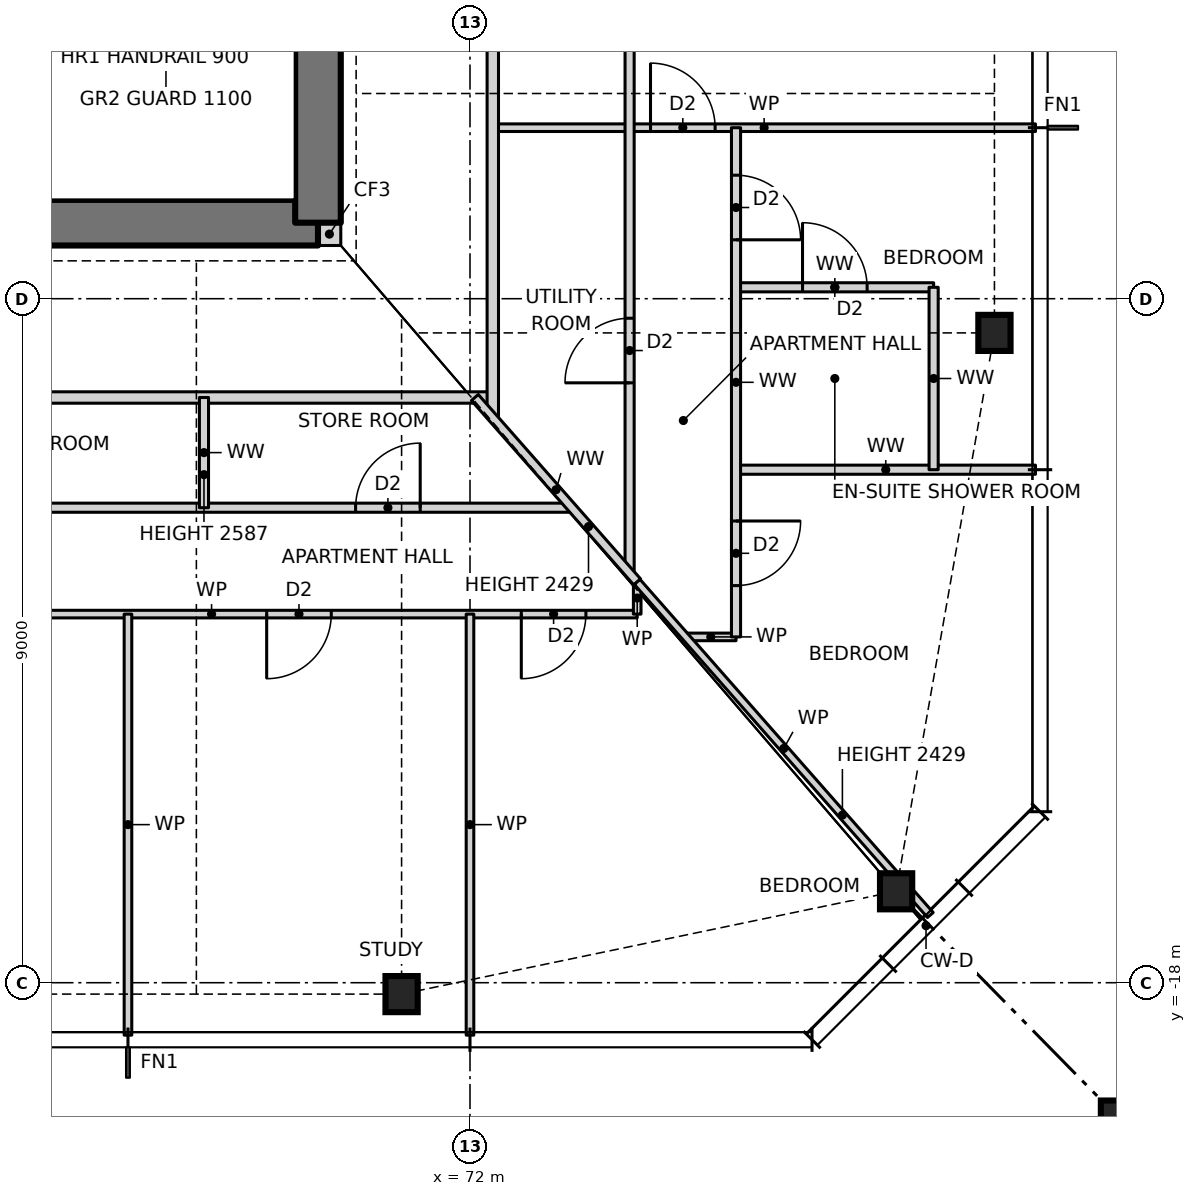
"""IFC4 building model, lengths in metres.
Left out: names, types, materials, properties, quantities, classifications, styles, units other than length and angle.
Written with IfcOpenShell. Run it as: python <this file> out.ifc"""

import sys

from ifc_helpers import new_model, si_unit, direction, frame, frame_2d, origin, origin_2d, place, context, subcontext, project, spatial, rectangle, hollow_rectangle, i_section, extrude, element, fill, save


model = new_model("IFC4")
c1 = context("Model", 3, precision=1e-05, world=origin(), true_north=direction((0.0, 1.0)))
c2 = subcontext(c1, "Body", "Model", "MODEL_VIEW")
j1 = project(units=[si_unit("LENGTHUNIT", "METRE"), si_unit("PLANEANGLEUNIT", "RADIAN")], contexts=[c1])
p1 = place(None, origin())
s1 = spatial("IfcSite", under=j1, at=p1, CompositionType="ELEMENT")
p2 = place(p1, origin())
s2 = spatial("IfcBuilding", under=s1, at=p2, CompositionType="ELEMENT")
p3 = place(p2, frame((0.0, 0.0, 32.5)))
s3 = spatial("IfcBuildingStorey", under=s2, at=p3, CompositionType="ELEMENT", Elevation=32.5)
for number, where, z_axis, x_axis in (
    (1, (71.1, -18.15, 0.0), (0.0, 0.0, 1.0), (1.0, 0.0, 0.0)),
    (2, (77.606, -16.797, 0.0), (0.0, 0.0, 1.0), (1.0, 0.0, 0.0)),
    (3, (78.9, -9.45, 0.0), (0.0, 0.0, 1.0), (1.0, 0.0, 0.0)),
):
    element("IfcColumn", number, at=place(p3, frame(where, z_axis=z_axis, x_axis=x_axis)), inside=s3, PredefinedType="COLUMN", context=c2, shape_type="SweptSolid", body=[
        extrude(i_section(OverallWidth=0.424, OverallDepth=0.475, WebThickness=0.048, FlangeThickness=0.077, at=origin_2d()), origin(), (0.0, 0.0, 1.0), 3.5),
    ])
p4 = place(p3, frame((80.9, -20.15, 0.0), z_axis=(0.0, 0.0, 1.0), x_axis=(1.0, 0.0, 0.0)))
e4 = element("IfcColumn", 4, at=p4, inside=s3, PredefinedType="COLUMN", context=c2, shape_type="SweptSolid", body=[
    extrude(hollow_rectangle(XDim=1.2, YDim=1.2, WallThickness=0.07, at=origin_2d()), origin(), (0.0, 0.0, 1.0), 3.5),
])
p5 = place(p3, frame((70.0, -8.15, 0.0), z_axis=(0.0, 0.0, 1.0), x_axis=(1.0, 0.0, 0.0)))
e5 = element("IfcWall", 5, at=p5, inside=s3, PredefinedType="SOLIDWALL", context=c2, shape_type="SweptSolid", body=[
    extrude(rectangle(XDim=0.3, YDim=0.3, at=frame_2d((0.15, 0.0))), origin(), (0.0, 0.0, 1.0), 3.5),
])
p6 = place(p3, frame((56.0, -8.0, 0.0), z_axis=(0.0, 0.0, 1.0), x_axis=(1.0, 0.0, 0.0)))
e6 = element("IfcWall", 6, at=p6, inside=s3, PredefinedType="SHEAR", context=c2, shape_type="SweptSolid", body=[
    extrude(rectangle(XDim=14.0, YDim=0.6, at=frame_2d((7.0, 0.0))), origin(), (0.0, 0.0, 1.0), 3.5),
])
p7 = place(p6, frame((2.7, 0.0, 0.0)))
e7 = element("IfcOpeningElement", 7, at=p7, cuts=e6, PredefinedType="OPENING", context=c2, shape_type="SweptSolid", body=[
    extrude(rectangle(XDim=0.9, YDim=2.1, at=frame_2d((0.45, 1.05))), frame((0.0, 0.31, 0.0), z_axis=(0.0, -1.0, 0.0), x_axis=(1.0, 0.0, 0.0)), (0.0, 0.0, 1.0), 0.62),
])
p8 = place(p6, frame((7.7, 0.0, 0.0)))
e8 = element("IfcOpeningElement", 8, at=p8, cuts=e6, PredefinedType="OPENING", context=c2, shape_type="SweptSolid", body=[
    extrude(rectangle(XDim=0.9, YDim=2.1, at=frame_2d((0.45, 1.05))), frame((0.0, 0.31, 0.0), z_axis=(0.0, -1.0, 0.0), x_axis=(1.0, 0.0, 0.0)), (0.0, 0.0, 1.0), 0.62),
])
p9 = place(p3, frame((70.0, -8.0, 0.0), z_axis=(0.0, 0.0, 1.0), x_axis=(0.0, 1.0, 0.0)))
e9 = element("IfcWall", 9, at=p9, inside=s3, PredefinedType="SHEAR", context=c2, shape_type="SweptSolid", body=[
    extrude(rectangle(XDim=16.0, YDim=0.6, at=frame_2d((8.0, 0.0))), origin(), (0.0, 0.0, 1.0), 3.5),
])
p10 = place(p9, frame((7.5, 0.0, 0.0)))
e10 = element("IfcOpeningElement", 10, at=p10, cuts=e9, PredefinedType="OPENING", context=c2, shape_type="SweptSolid", body=[
    extrude(rectangle(XDim=1.0, YDim=2.1, at=frame_2d((0.5, 1.05))), frame((0.0, 0.31, 0.0), z_axis=(0.0, -1.0, 0.0), x_axis=(1.0, 0.0, 0.0)), (0.0, 0.0, 1.0), 0.62),
])
p11 = place(p3, frame((74.836, -13.45, 0.0), z_axis=(0.0, 0.0, 1.0), x_axis=(1.0, 0.0, 0.0)))
e11 = element("IfcWall", 11, at=p11, inside=s3, PredefinedType="PARTITIONING", context=c2, shape_type="SweptSolid", body=[
    extrude(rectangle(XDim=0.664, YDim=0.1, at=frame_2d((0.332, 0.0))), origin(), (0.0, 0.0, 1.0), 3.27),
])
p12 = place(p3, frame((63.0, -13.15, 0.0), z_axis=(0.0, 0.0, 1.0), x_axis=(1.0, 0.0, 0.0)))
e12 = element("IfcWall", 12, at=p12, inside=s3, PredefinedType="PARTITIONING", context=c2, shape_type="SweptSolid", body=[
    extrude(rectangle(XDim=11.2, YDim=0.1, at=frame_2d((5.6, 0.0))), origin(), (0.0, 0.0, 1.0), 3.27),
])
p13 = place(p12, frame((1.825, 0.0, 0.0)))
e13 = element("IfcOpeningElement", 13, at=p13, cuts=e12, PredefinedType="OPENING", context=c2, shape_type="SweptSolid", body=[
    extrude(rectangle(XDim=0.85, YDim=2.1, at=frame_2d((0.425, 1.05))), frame((0.0, 0.06, 0.0), z_axis=(0.0, -1.0, 0.0), x_axis=(1.0, 0.0, 0.0)), (0.0, 0.0, 1.0), 0.12),
])
p14 = place(p12, frame((6.325, 0.0, 0.0)))
e14 = element("IfcOpeningElement", 14, at=p14, cuts=e12, PredefinedType="OPENING", context=c2, shape_type="SweptSolid", body=[
    extrude(rectangle(XDim=0.85, YDim=2.1, at=frame_2d((0.425, 1.05))), frame((0.0, 0.06, 0.0), z_axis=(0.0, -1.0, 0.0), x_axis=(1.0, 0.0, 0.0)), (0.0, 0.0, 1.0), 0.12),
])
p15 = place(p12, frame((9.675, 0.0, 0.0)))
e15 = element("IfcOpeningElement", 15, at=p15, cuts=e12, PredefinedType="OPENING", context=c2, shape_type="SweptSolid", body=[
    extrude(rectangle(XDim=0.85, YDim=2.1, at=frame_2d((0.425, 1.05))), frame((0.0, 0.06, 0.0), z_axis=(0.0, -1.0, 0.0), x_axis=(1.0, 0.0, 0.0)), (0.0, 0.0, 1.0), 0.12),
])
p16 = place(p3, frame((54.0, -11.75, 0.0), z_axis=(0.0, 0.0, 1.0), x_axis=(1.0, 0.0, 0.0)))
e16 = element("IfcWall", 16, at=p16, inside=s3, PredefinedType="PARTITIONING", context=c2, shape_type="SweptSolid", body=[
    extrude(rectangle(XDim=19.34, YDim=0.12, at=frame_2d((9.67, 0.0))), origin(), (0.0, 0.0, 1.0), 3.27),
])
p17 = place(p16, frame((1.375, 0.0, 0.0)))
e17 = element("IfcOpeningElement", 17, at=p17, cuts=e16, PredefinedType="OPENING", context=c2, shape_type="SweptSolid", body=[
    extrude(rectangle(XDim=0.85, YDim=2.1, at=frame_2d((0.425, 1.05))), frame((0.0, 0.07, 0.0), z_axis=(0.0, -1.0, 0.0), x_axis=(1.0, 0.0, 0.0)), (0.0, 0.0, 1.0), 0.14),
])
p18 = place(p16, frame((4.575, 0.0, 0.0)))
e18 = element("IfcOpeningElement", 18, at=p18, cuts=e16, PredefinedType="OPENING", context=c2, shape_type="SweptSolid", body=[
    extrude(rectangle(XDim=0.85, YDim=2.1, at=frame_2d((0.425, 1.05))), frame((0.0, 0.07, 0.0), z_axis=(0.0, -1.0, 0.0), x_axis=(1.0, 0.0, 0.0)), (0.0, 0.0, 1.0), 0.14),
])
p19 = place(p16, frame((11.325, 0.0, 0.0)))
e19 = element("IfcOpeningElement", 19, at=p19, cuts=e16, PredefinedType="OPENING", context=c2, shape_type="SweptSolid", body=[
    extrude(rectangle(XDim=0.85, YDim=2.1, at=frame_2d((0.425, 1.05))), frame((0.0, 0.07, 0.0), z_axis=(0.0, -1.0, 0.0), x_axis=(1.0, 0.0, 0.0)), (0.0, 0.0, 1.0), 0.14),
])
p20 = place(p16, frame((16.495, 0.0, 0.0)))
e20 = element("IfcOpeningElement", 20, at=p20, cuts=e16, PredefinedType="OPENING", context=c2, shape_type="SweptSolid", body=[
    extrude(rectangle(XDim=0.85, YDim=2.1, at=frame_2d((0.425, 1.05))), frame((0.0, 0.07, 0.0), z_axis=(0.0, -1.0, 0.0), x_axis=(1.0, 0.0, 0.0)), (0.0, 0.0, 1.0), 0.14),
])
p21 = place(p3, frame((75.5, -11.25, 0.0), z_axis=(0.0, 0.0, 1.0), x_axis=(1.0, 0.0, 0.0)))
e21 = element("IfcWall", 21, at=p21, inside=s3, PredefinedType="PARTITIONING", context=c2, shape_type="SweptSolid", body=[
    extrude(rectangle(XDim=3.94, YDim=0.12, at=frame_2d((1.97, 0.0))), origin(), (0.0, 0.0, 1.0), 3.27),
])
p22 = place(p3, frame((53.7, -10.3, 0.0), z_axis=(0.0, 0.0, 1.0), x_axis=(1.0, 0.0, 0.0)))
e22 = element("IfcWall", 22, at=p22, inside=s3, PredefinedType="PARTITIONING", context=c2, shape_type="SweptSolid", body=[
    extrude(rectangle(XDim=18.6, YDim=0.15, at=frame_2d((9.3, 0.0))), origin(), (0.0, 0.0, 1.0), 3.27),
])
p23 = place(p22, frame((4.8, 0.0, 0.0)))
e23 = element("IfcOpeningElement", 23, at=p23, cuts=e22, PredefinedType="OPENING", context=c2, shape_type="SweptSolid", body=[
    extrude(rectangle(XDim=1.0, YDim=2.1, at=frame_2d((0.5, 1.05))), frame((0.0, 0.085, 0.0), z_axis=(0.0, -1.0, 0.0), x_axis=(1.0, 0.0, 0.0)), (0.0, 0.0, 1.0), 0.17),
])
p24 = place(p3, frame((75.5, -8.85, 0.0), z_axis=(0.0, 0.0, 1.0), x_axis=(1.0, 0.0, 0.0)))
e24 = element("IfcWall", 24, at=p24, inside=s3, PredefinedType="PARTITIONING", context=c2, shape_type="SweptSolid", body=[
    extrude(rectangle(XDim=2.6, YDim=0.12, at=frame_2d((1.3, 0.0))), origin(), (0.0, 0.0, 1.0), 3.27),
])
p25 = place(p24, frame((0.875, 0.0, 0.0)))
e25 = element("IfcOpeningElement", 25, at=p25, cuts=e24, PredefinedType="OPENING", context=c2, shape_type="SweptSolid", body=[
    extrude(rectangle(XDim=0.85, YDim=2.1, at=frame_2d((0.425, 1.05))), frame((0.0, 0.07, 0.0), z_axis=(0.0, -1.0, 0.0), x_axis=(1.0, 0.0, 0.0)), (0.0, 0.0, 1.0), 0.14),
])
p26 = place(p3, frame((72.3, -6.75, 0.0), z_axis=(0.0, 0.0, 1.0), x_axis=(1.0, 0.0, 0.0)))
e26 = element("IfcWall", 26, at=p26, inside=s3, PredefinedType="PARTITIONING", context=c2, shape_type="SweptSolid", body=[
    extrude(rectangle(XDim=7.14, YDim=0.1, at=frame_2d((3.57, 0.0))), origin(), (0.0, 0.0, 1.0), 3.27),
])
p27 = place(p26, frame((2.075, 0.0, 0.0)))
e27 = element("IfcOpeningElement", 27, at=p27, cuts=e26, PredefinedType="OPENING", context=c2, shape_type="SweptSolid", body=[
    extrude(rectangle(XDim=0.85, YDim=2.1, at=frame_2d((0.425, 1.05))), frame((0.0, 0.06, 0.0), z_axis=(0.0, -1.0, 0.0), x_axis=(1.0, 0.0, 0.0)), (0.0, 0.0, 1.0), 0.12),
])
p28 = place(p3, frame((78.1, -11.25, 0.0), z_axis=(0.0, 0.0, 1.0), x_axis=(0.0, 1.0, 0.0)))
e28 = element("IfcWall", 28, at=p28, inside=s3, PredefinedType="PARTITIONING", context=c2, shape_type="SweptSolid", body=[
    extrude(rectangle(XDim=2.4, YDim=0.12, at=frame_2d((1.2, 0.0))), origin(), (0.0, 0.0, 1.0), 3.27),
])
p29 = place(p3, frame((75.5, -13.45, 0.0), z_axis=(0.0, 0.0, 1.0), x_axis=(0.0, 1.0, 0.0)))
e29 = element("IfcWall", 29, at=p29, inside=s3, PredefinedType="PARTITIONING", context=c2, shape_type="SweptSolid", body=[
    extrude(rectangle(XDim=6.7, YDim=0.12, at=frame_2d((3.35, 0.0))), origin(), (0.0, 0.0, 1.0), 3.27),
])
p30 = place(p29, frame((5.225, 0.0, 0.0)))
e30 = element("IfcOpeningElement", 30, at=p30, cuts=e29, PredefinedType="OPENING", context=c2, shape_type="SweptSolid", body=[
    extrude(rectangle(XDim=0.85, YDim=2.1, at=frame_2d((0.425, 1.05))), frame((0.0, 0.07, 0.0), z_axis=(0.0, -1.0, 0.0), x_axis=(1.0, 0.0, 0.0)), (0.0, 0.0, 1.0), 0.14),
])
p31 = place(p29, frame((0.675, 0.0, 0.0)))
e31 = element("IfcOpeningElement", 31, at=p31, cuts=e29, PredefinedType="OPENING", context=c2, shape_type="SweptSolid", body=[
    extrude(rectangle(XDim=0.85, YDim=2.1, at=frame_2d((0.425, 1.05))), frame((0.0, 0.07, 0.0), z_axis=(0.0, -1.0, 0.0), x_axis=(1.0, 0.0, 0.0)), (0.0, 0.0, 1.0), 0.14),
])
p32 = place(p3, frame((74.2, -13.15, 0.0), z_axis=(0.0, 0.0, 1.0), x_axis=(0.0, 1.0, 0.0)))
e32 = element("IfcWall", 32, at=p32, inside=s3, PredefinedType="PARTITIONING", context=c2, shape_type="SweptSolid", body=[
    extrude(rectangle(XDim=0.423, YDim=0.1, at=frame_2d((0.211, 0.0))), origin(), (0.0, 0.0, 1.0), 3.27),
])
p33 = place(p3, frame((74.1, -12.614, 0.0), z_axis=(0.0, 0.0, 1.0), x_axis=(0.0, 1.0, 0.0)))
e33 = element("IfcWall", 33, at=p33, inside=s3, PredefinedType="PARTITIONING", context=c2, shape_type="SweptSolid", body=[
    extrude(rectangle(XDim=25.228, YDim=0.12, at=frame_2d((12.614, 0.0))), origin(), (0.0, 0.0, 1.0), 3.27),
])
p34 = place(p33, frame((7.239, 0.0, 0.0)))
e34 = element("IfcOpeningElement", 34, at=p34, cuts=e33, PredefinedType="OPENING", context=c2, shape_type="SweptSolid", body=[
    extrude(rectangle(XDim=0.85, YDim=2.1, at=frame_2d((0.425, 1.05))), frame((0.0, 0.07, 0.0), z_axis=(0.0, -1.0, 0.0), x_axis=(1.0, 0.0, 0.0)), (0.0, 0.0, 1.0), 0.14),
])
p35 = place(p33, frame((10.439, 0.0, 0.0)))
e35 = element("IfcOpeningElement", 35, at=p35, cuts=e33, PredefinedType="OPENING", context=c2, shape_type="SweptSolid", body=[
    extrude(rectangle(XDim=0.85, YDim=2.1, at=frame_2d((0.425, 1.05))), frame((0.0, 0.07, 0.0), z_axis=(0.0, -1.0, 0.0), x_axis=(1.0, 0.0, 0.0)), (0.0, 0.0, 1.0), 0.14),
])
p36 = place(p33, frame((2.507, 0.0, 0.0)))
e36 = element("IfcOpeningElement", 36, at=p36, cuts=e33, PredefinedType="OPENING", context=c2, shape_type="SweptSolid", body=[
    extrude(rectangle(XDim=0.85, YDim=2.1, at=frame_2d((0.425, 1.05))), frame((0.0, 0.07, 0.0), z_axis=(0.0, -1.0, 0.0), x_axis=(1.0, 0.0, 0.0)), (0.0, 0.0, 1.0), 0.14),
])
p37 = place(p33, frame((16.639, 0.0, 0.0)))
e37 = element("IfcOpeningElement", 37, at=p37, cuts=e33, PredefinedType="OPENING", context=c2, shape_type="SweptSolid", body=[
    extrude(rectangle(XDim=0.85, YDim=2.1, at=frame_2d((0.425, 1.05))), frame((0.0, 0.07, 0.0), z_axis=(0.0, -1.0, 0.0), x_axis=(1.0, 0.0, 0.0)), (0.0, 0.0, 1.0), 0.14),
])
p38 = place(p33, frame((21.821, 0.0, 0.0)))
e38 = element("IfcOpeningElement", 38, at=p38, cuts=e33, PredefinedType="OPENING", context=c2, shape_type="SweptSolid", body=[
    extrude(rectangle(XDim=0.85, YDim=2.1, at=frame_2d((0.425, 1.05))), frame((0.0, 0.07, 0.0), z_axis=(0.0, -1.0, 0.0), x_axis=(1.0, 0.0, 0.0)), (0.0, 0.0, 1.0), 0.14),
])
p39 = place(p3, frame((72.3, -10.568, 0.0), z_axis=(0.0, 0.0, 1.0), x_axis=(0.0, 1.0, 0.0)))
e39 = element("IfcWall", 39, at=p39, inside=s3, PredefinedType="PARTITIONING", context=c2, shape_type="SweptSolid", body=[
    extrude(rectangle(XDim=21.136, YDim=0.15, at=frame_2d((10.568, 0.0))), origin(), (0.0, 0.0, 1.0), 3.27),
])
p40 = place(p39, frame((8.318, 0.0, 0.0)))
e40 = element("IfcOpeningElement", 40, at=p40, cuts=e39, PredefinedType="OPENING", context=c2, shape_type="SweptSolid", body=[
    extrude(rectangle(XDim=1.0, YDim=2.1, at=frame_2d((0.5, 1.05))), frame((0.0, 0.085, 0.0), z_axis=(0.0, -1.0, 0.0), x_axis=(1.0, 0.0, 0.0)), (0.0, 0.0, 1.0), 0.17),
])
p41 = place(p3, frame((72.0, -18.69, 0.0), z_axis=(0.0, 0.0, 1.0), x_axis=(0.0, 1.0, 0.0)))
e41 = element("IfcWall", 41, at=p41, inside=s3, PredefinedType="PARTITIONING", context=c2, shape_type="SweptSolid", body=[
    extrude(rectangle(XDim=5.54, YDim=0.1, at=frame_2d((2.77, 0.0))), origin(), (0.0, 0.0, 1.0), 3.27),
])
p42 = place(p3, frame((68.5, -11.75, 0.0), z_axis=(0.0, 0.0, 1.0), x_axis=(0.0, 1.0, 0.0)))
e42 = element("IfcWall", 42, at=p42, inside=s3, PredefinedType="PARTITIONING", context=c2, shape_type="SweptSolid", body=[
    extrude(rectangle(XDim=1.45, YDim=0.12, at=frame_2d((0.725, 0.0))), origin(), (0.0, 0.0, 1.0), 2.587),
])
p43 = place(p3, frame((67.5, -18.69, 0.0), z_axis=(0.0, 0.0, 1.0), x_axis=(0.0, 1.0, 0.0)))
e43 = element("IfcWall", 43, at=p43, inside=s3, PredefinedType="PARTITIONING", context=c2, shape_type="SweptSolid", body=[
    extrude(rectangle(XDim=5.54, YDim=0.1, at=frame_2d((2.77, 0.0))), origin(), (0.0, 0.0, 1.0), 3.27),
])
p44 = place(p3, frame((74.2, -12.727, 0.0), z_axis=(0.0, 0.0, 1.0), x_axis=(-0.660667046586, 0.75067906162, 0.0)))
e44 = element("IfcWall", 44, at=p44, inside=s3, PredefinedType="PARTITIONING", context=c2, shape_type="SweptSolid", body=[
    extrude(rectangle(XDim=3.233, YDim=0.12, at=frame_2d((1.617, 0.0))), origin(), (0.0, 0.0, 1.0), 2.429),
])
p45 = place(p3, frame((78.057, -17.109, 0.0), z_axis=(0.0, 0.0, 1.0), x_axis=(-0.660698595885, 0.750651294141, 0.0)))
e45 = element("IfcWall", 45, at=p45, inside=s3, PredefinedType="PARTITIONING", context=c2, shape_type="SweptSolid", body=[
    extrude(rectangle(XDim=5.838, YDim=0.1, at=frame_2d((2.919, 0.0))), origin(), (0.0, 0.0, 1.0), 2.429),
])
p46 = place(p14, frame((0.85, 0.0, 0.0), z_axis=(0.0, 0.0, 1.0), x_axis=(-1.0, 0.0, 0.0)))
e46 = element("IfcDoor", 46, at=p46, inside=s3, OperationType="SINGLE_SWING_RIGHT", PredefinedType="DOOR", context=c2, shape_type="SweptSolid", body=[
    extrude(rectangle(XDim=0.85, YDim=2.1, at=frame_2d((0.425, 1.05))), frame((0.0, 0.025, 0.0), z_axis=(0.0, -1.0, 0.0), x_axis=(1.0, 0.0, 0.0)), (0.0, 0.0, 1.0), 0.05),
])
fill(e14, e46)
p47 = place(p15, frame((0.85, 0.0, 0.0), z_axis=(0.0, 0.0, 1.0), x_axis=(-1.0, 0.0, 0.0)))
e47 = element("IfcDoor", 47, at=p47, inside=s3, OperationType="SINGLE_SWING_RIGHT", PredefinedType="DOOR", context=c2, shape_type="SweptSolid", body=[
    extrude(rectangle(XDim=0.85, YDim=2.1, at=frame_2d((0.425, 1.05))), frame((0.0, 0.025, 0.0), z_axis=(0.0, -1.0, 0.0), x_axis=(1.0, 0.0, 0.0)), (0.0, 0.0, 1.0), 0.05),
])
fill(e15, e47)
p48 = place(p20, origin())
e48 = element("IfcDoor", 48, at=p48, inside=s3, OperationType="SINGLE_SWING_RIGHT", PredefinedType="DOOR", context=c2, shape_type="SweptSolid", body=[
    extrude(rectangle(XDim=0.85, YDim=2.1, at=frame_2d((0.425, 1.05))), frame((0.0, 0.025, 0.0), z_axis=(0.0, -1.0, 0.0), x_axis=(1.0, 0.0, 0.0)), (0.0, 0.0, 1.0), 0.05),
])
fill(e20, e48)
p49 = place(p27, origin())
e49 = element("IfcDoor", 49, at=p49, inside=s3, OperationType="SINGLE_SWING_LEFT", PredefinedType="DOOR", context=c2, shape_type="SweptSolid", body=[
    extrude(rectangle(XDim=0.85, YDim=2.1, at=frame_2d((0.425, 1.05))), frame((0.0, 0.025, 0.0), z_axis=(0.0, -1.0, 0.0), x_axis=(1.0, 0.0, 0.0)), (0.0, 0.0, 1.0), 0.05),
])
fill(e27, e49)
p50 = place(p25, origin())
e50 = element("IfcDoor", 50, at=p50, inside=s3, OperationType="SINGLE_SWING_LEFT", PredefinedType="DOOR", context=c2, shape_type="SweptSolid", body=[
    extrude(rectangle(XDim=0.85, YDim=2.1, at=frame_2d((0.425, 1.05))), frame((0.0, 0.025, 0.0), z_axis=(0.0, -1.0, 0.0), x_axis=(1.0, 0.0, 0.0)), (0.0, 0.0, 1.0), 0.05),
])
fill(e25, e50)
p51 = place(p30, frame((0.85, 0.0, 0.0), z_axis=(0.0, 0.0, 1.0), x_axis=(-1.0, 0.0, 0.0)))
e51 = element("IfcDoor", 51, at=p51, inside=s3, OperationType="SINGLE_SWING_RIGHT", PredefinedType="DOOR", context=c2, shape_type="SweptSolid", body=[
    extrude(rectangle(XDim=0.85, YDim=2.1, at=frame_2d((0.425, 1.05))), frame((0.0, 0.025, 0.0), z_axis=(0.0, -1.0, 0.0), x_axis=(1.0, 0.0, 0.0)), (0.0, 0.0, 1.0), 0.05),
])
fill(e30, e51)
p52 = place(p31, frame((0.85, 0.0, 0.0), z_axis=(0.0, 0.0, 1.0), x_axis=(-1.0, 0.0, 0.0)))
e52 = element("IfcDoor", 52, at=p52, inside=s3, OperationType="SINGLE_SWING_LEFT", PredefinedType="DOOR", context=c2, shape_type="SweptSolid", body=[
    extrude(rectangle(XDim=0.85, YDim=2.1, at=frame_2d((0.425, 1.05))), frame((0.0, 0.025, 0.0), z_axis=(0.0, -1.0, 0.0), x_axis=(1.0, 0.0, 0.0)), (0.0, 0.0, 1.0), 0.05),
])
fill(e31, e52)
p53 = place(p36, origin())
e53 = element("IfcDoor", 53, at=p53, inside=s3, OperationType="SINGLE_SWING_LEFT", PredefinedType="DOOR", context=c2, shape_type="SweptSolid", body=[
    extrude(rectangle(XDim=0.85, YDim=2.1, at=frame_2d((0.425, 1.05))), frame((0.0, 0.025, 0.0), z_axis=(0.0, -1.0, 0.0), x_axis=(1.0, 0.0, 0.0)), (0.0, 0.0, 1.0), 0.05),
])
fill(e36, e53)
save(model, sys.argv[1])
